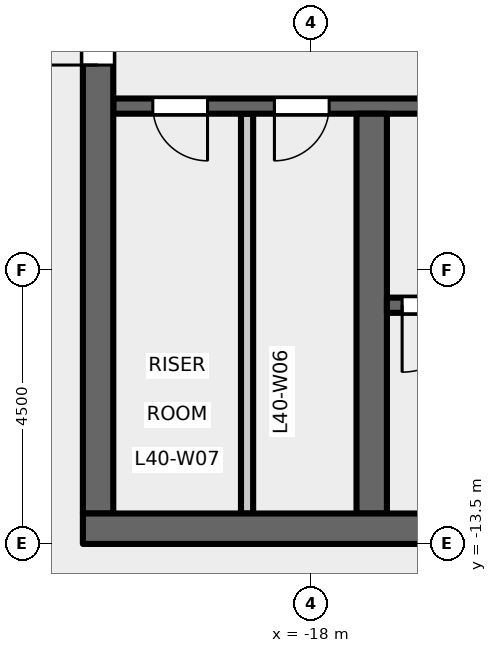
"""IFC4 building model, lengths in metres.
Left out: names, types, materials, properties, quantities, classifications, styles, units other than length and angle.
Written with IfcOpenShell. Run it as: python <this file> out.ifc"""

import sys

from ifc_helpers import new_model, si_unit, direction, frame, frame_2d, origin, place, context, subcontext, project, spatial, rectangle, extrude, element, fill, save


model = new_model("IFC4")
c1 = context("Model", 3, precision=1e-05, world=origin(), true_north=direction((0.0, 1.0)))
c2 = subcontext(c1, "Body", "Model", "MODEL_VIEW")
j1 = project(units=[si_unit("LENGTHUNIT", "METRE"), si_unit("PLANEANGLEUNIT", "RADIAN")], contexts=[c1])
p1 = place(None, origin())
s1 = spatial("IfcSite", under=j1, at=p1, CompositionType="ELEMENT")
p2 = place(p1, origin())
s2 = spatial("IfcBuilding", under=s1, at=p2, CompositionType="ELEMENT")
p3 = place(p2, frame((0.0, 0.0, 187.2)))
s3 = spatial("IfcBuildingStorey", under=s2, at=p3, CompositionType="ELEMENT", Elevation=187.2)
p4 = place(p3, frame((-12.15, -6.3, 0.0), z_axis=(0.0, 0.0, 1.0), x_axis=(-1.0, 0.0, 0.0)))
e1 = element("IfcWall", 1, at=p4, inside=s3, PredefinedType="SHEAR", context=c2, shape_type="SweptSolid", body=[
    extrude(rectangle(XDim=9.1, YDim=0.25, at=frame_2d((4.55, 0.0))), origin(), (0.0, 0.0, 1.0), 5.35),
])
p5 = place(p4, frame((1.8, 0.0, 0.0)))
e2 = element("IfcOpeningElement", 2, at=p5, cuts=e1, PredefinedType="OPENING", context=c2, shape_type="SweptSolid", body=[
    extrude(rectangle(XDim=1.0, YDim=2.1, at=frame_2d((0.5, 1.05))), frame((0.0, 0.135, 0.0), z_axis=(0.0, -1.0, 0.0), x_axis=(1.0, 0.0, 0.0)), (0.0, 0.0, 1.0), 0.27),
])
p6 = place(p4, frame((5.55, 0.0, 0.0)))
e3 = element("IfcOpeningElement", 3, at=p6, cuts=e1, PredefinedType="OPENING", context=c2, shape_type="SweptSolid", body=[
    extrude(rectangle(XDim=0.9, YDim=2.1, at=frame_2d((0.45, 1.05))), frame((0.0, 0.135, 0.0), z_axis=(0.0, -1.0, 0.0), x_axis=(1.0, 0.0, 0.0)), (0.0, 0.0, 1.0), 0.27),
])
p7 = place(p4, frame((7.55, 0.0, 0.0)))
e4 = element("IfcOpeningElement", 4, at=p7, cuts=e1, PredefinedType="OPENING", context=c2, shape_type="SweptSolid", body=[
    extrude(rectangle(XDim=0.9, YDim=2.1, at=frame_2d((0.45, 1.05))), frame((0.0, 0.135, 0.0), z_axis=(0.0, -1.0, 0.0), x_axis=(1.0, 0.0, 0.0)), (0.0, 0.0, 1.0), 0.27),
])
p8 = place(p3, frame((-21.5, -13.0, 0.0), z_axis=(0.0, 0.0, 1.0), x_axis=(0.0, 1.0, 0.0)))
e5 = element("IfcWall", 5, at=p8, inside=s3, PredefinedType="SHEAR", context=c2, shape_type="SweptSolid", body=[
    extrude(rectangle(XDim=26.0, YDim=0.5, at=frame_2d((13.0, 0.0))), origin(), (0.0, 0.0, 1.0), 5.35),
])
p9 = place(p8, frame((16.825, 0.0, 0.0)))
e6 = element("IfcOpeningElement", 6, at=p9, cuts=e5, PredefinedType="OPENING", context=c2, shape_type="SweptSolid", body=[
    extrude(rectangle(XDim=1.8, YDim=2.1, at=frame_2d((0.9, 1.05))), frame((0.0, 0.26, 0.0), z_axis=(0.0, -1.0, 0.0), x_axis=(1.0, 0.0, 0.0)), (0.0, 0.0, 1.0), 0.52),
])
p10 = place(p8, frame((7.375, 0.0, 0.0)))
e7 = element("IfcOpeningElement", 7, at=p10, cuts=e5, PredefinedType="OPENING", context=c2, shape_type="SweptSolid", body=[
    extrude(rectangle(XDim=1.8, YDim=2.1, at=frame_2d((0.9, 1.05))), frame((0.0, 0.26, 0.0), z_axis=(0.0, -1.0, 0.0), x_axis=(1.0, 0.0, 0.0)), (0.0, 0.0, 1.0), 0.52),
])
p11 = place(p8, frame((23.8, 0.0, 0.0)))
e8 = element("IfcOpeningElement", 8, at=p11, cuts=e5, PredefinedType="OPENING", context=c2, shape_type="SweptSolid", body=[
    extrude(rectangle(XDim=0.9, YDim=2.1, at=frame_2d((0.45, 1.05))), frame((0.0, 0.26, 0.0), z_axis=(0.0, -1.0, 0.0), x_axis=(1.0, 0.0, 0.0)), (0.0, 0.0, 1.0), 0.52),
])
p12 = place(p3, frame((-19.05, -13.0, 0.0), z_axis=(0.0, 0.0, 1.0), x_axis=(0.0, 1.0, 0.0)))
e9 = element("IfcWall", 9, at=p12, inside=s3, PredefinedType="PARTITIONING", context=c2, shape_type="SweptSolid", body=[
    extrude(rectangle(XDim=6.575, YDim=0.2, at=frame_2d((3.288, 0.0))), origin(), (0.0, 0.0, 1.0), 5.35),
])
p13 = place(p3, frame((-17.0, -13.0, 0.0), z_axis=(0.0, 0.0, 1.0), x_axis=(0.0, 1.0, 0.0)))
e10 = element("IfcWall", 10, at=p13, inside=s3, PredefinedType="SHEAR", context=c2, shape_type="SweptSolid", body=[
    extrude(rectangle(XDim=6.575, YDim=0.5, at=frame_2d((3.288, 0.0))), origin(), (0.0, 0.0, 1.0), 5.35),
])
p14 = place(p3, frame((-8.75, -9.575, 0.0), z_axis=(0.0, 0.0, 1.0), x_axis=(-1.0, 0.0, 0.0)))
e11 = element("IfcWall", 11, at=p14, inside=s3, PredefinedType="SHEAR", context=c2, shape_type="SweptSolid", body=[
    extrude(rectangle(XDim=8.0, YDim=0.25, at=frame_2d((4.0, 0.0))), origin(), (0.0, 0.0, 1.0), 5.35),
])
p15 = place(p14, frame((6.65, 0.0, 0.0)))
e12 = element("IfcOpeningElement", 12, at=p15, cuts=e11, PredefinedType="OPENING", context=c2, shape_type="SweptSolid", body=[
    extrude(rectangle(XDim=1.1, YDim=2.1, at=frame_2d((0.55, 1.05))), frame((0.0, 0.135, 0.0), z_axis=(0.0, -1.0, 0.0), x_axis=(1.0, 0.0, 0.0)), (0.0, 0.0, 1.0), 0.27),
])
p16 = place(p3, frame((-8.25, -13.25, 0.0), z_axis=(0.0, 0.0, 1.0), x_axis=(-1.0, 0.0, 0.0)))
e13 = element("IfcWall", 13, at=p16, inside=s3, PredefinedType="SHEAR", context=c2, shape_type="SweptSolid", body=[
    extrude(rectangle(XDim=13.5, YDim=0.5, at=frame_2d((6.75, 0.0))), origin(), (0.0, 0.0, 1.0), 5.35),
])
p17 = place(p15, origin())
e14 = element("IfcDoor", 14, at=p17, inside=s3, OperationType="SINGLE_SWING_LEFT", PredefinedType="DOOR", context=c2, shape_type="SweptSolid", body=[
    extrude(rectangle(XDim=1.1, YDim=2.1, at=frame_2d((0.55, 1.05))), frame((0.0, 0.025, 0.0), z_axis=(0.0, -1.0, 0.0), x_axis=(1.0, 0.0, 0.0)), (0.0, 0.0, 1.0), 0.05),
])
fill(e12, e14)
p18 = place(p10, origin())
e15 = element("IfcDoor", 15, at=p18, inside=s3, OperationType="DOUBLE_DOOR_DOUBLE_SWING", PredefinedType="DOOR", context=c2, shape_type="SweptSolid", body=[
    extrude(rectangle(XDim=1.8, YDim=2.1, at=frame_2d((0.9, 1.05))), frame((0.0, 0.025, 0.0), z_axis=(0.0, -1.0, 0.0), x_axis=(1.0, 0.0, 0.0)), (0.0, 0.0, 1.0), 0.05),
])
fill(e7, e15)
p19 = place(p6, origin())
e16 = element("IfcDoor", 16, at=p19, inside=s3, OperationType="SINGLE_SWING_LEFT", PredefinedType="DOOR", context=c2, shape_type="SweptSolid", body=[
    extrude(rectangle(XDim=0.9, YDim=2.1, at=frame_2d((0.45, 1.05))), frame((0.0, 0.025, 0.0), z_axis=(0.0, -1.0, 0.0), x_axis=(1.0, 0.0, 0.0)), (0.0, 0.0, 1.0), 0.05),
])
fill(e3, e16)
p20 = place(p7, origin())
e17 = element("IfcDoor", 17, at=p20, inside=s3, OperationType="SINGLE_SWING_RIGHT", PredefinedType="DOOR", context=c2, shape_type="SweptSolid", body=[
    extrude(rectangle(XDim=0.9, YDim=2.1, at=frame_2d((0.45, 1.05))), frame((0.0, 0.025, 0.0), z_axis=(0.0, -1.0, 0.0), x_axis=(1.0, 0.0, 0.0)), (0.0, 0.0, 1.0), 0.05),
])
fill(e4, e17)
save(model, sys.argv[1])
